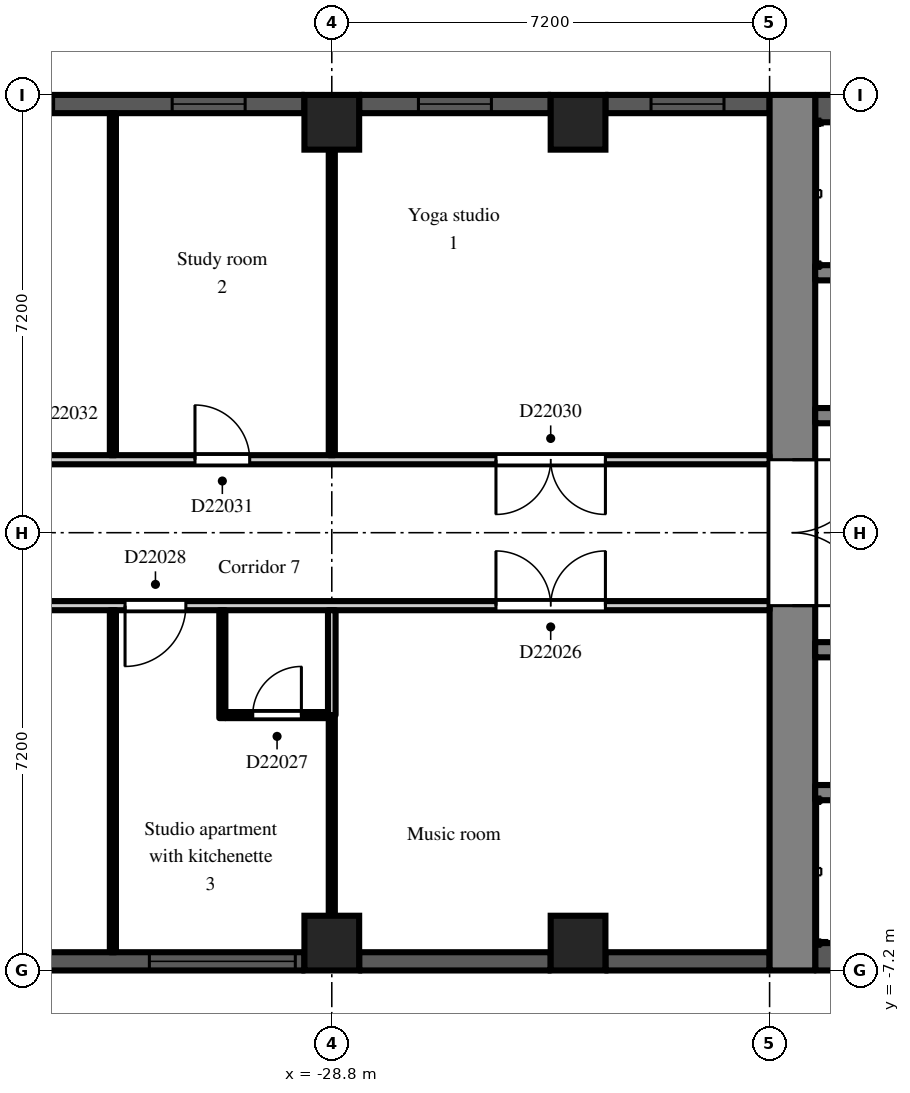
"""IFC4 building model, lengths in metres.
Left out: names, types, materials, properties, quantities, classifications, styles, units other than length and angle.
Written with IfcOpenShell. Run it as: python <this file> out.ifc"""

import sys

from ifc_helpers import new_model, si_unit, direction, frame, frame_2d, origin, origin_2d, place, context, subcontext, project, spatial, rectangle, extrude, element, fill, save


model = new_model("IFC4")
c1 = context("Model", 3, precision=1e-05, world=origin(), true_north=direction((0.0, 1.0)))
c2 = subcontext(c1, "Body", "Model", "MODEL_VIEW")
j1 = project(units=[si_unit("LENGTHUNIT", "METRE"), si_unit("PLANEANGLEUNIT", "RADIAN")], contexts=[c1])
p1 = place(None, origin())
s1 = spatial("IfcSite", under=j1, at=p1, CompositionType="ELEMENT")
p2 = place(p1, origin())
s2 = spatial("IfcBuilding", under=s1, at=p2, CompositionType="ELEMENT")
p3 = place(p2, frame((0.0, 0.0, 159.3)))
s3 = spatial("IfcBuildingStorey", under=s2, at=p3, CompositionType="ELEMENT", Elevation=159.3)
for number, where, z_axis, x_axis in (
    (1, (-28.8, -6.75, 0.0), (0.0, 0.0, 1.0), (1.0, 0.0, 0.0)),
    (2, (-28.8, 6.75, 0.0), (0.0, 0.0, 1.0), (1.0, 0.0, 0.0)),
    (3, (-24.75, -6.75, 0.0), (0.0, 0.0, 1.0), (1.0, 0.0, 0.0)),
    (4, (-24.75, 6.75, 0.0), (0.0, 0.0, 1.0), (1.0, 0.0, 0.0)),
):
    element("IfcColumn", number, at=place(p3, frame(where, z_axis=z_axis, x_axis=x_axis)), inside=s3, PredefinedType="COLUMN", context=c2, shape_type="SweptSolid", body=[
        extrude(rectangle(XDim=0.9, YDim=0.9, at=origin_2d()), origin(), (0.0, 0.0, 1.0), 3.0),
    ])
p4 = place(p3, frame((-21.6, 7.05, 0.0), z_axis=(0.0, 0.0, 1.0), x_axis=(-1.0, 0.0, 0.0)))
e5 = element("IfcWall", 5, at=p4, inside=s3, PredefinedType="SOLIDWALL", context=c2, shape_type="SweptSolid", body=[
    extrude(rectangle(XDim=2.7, YDim=0.3, at=frame_2d((1.35, 0.0))), origin(), (0.0, 0.0, 1.0), 2.2),
])
p5 = place(p4, frame((0.75, 0.0, 0.2)))
e6 = element("IfcOpeningElement", 6, at=p5, cuts=e5, PredefinedType="OPENING", context=c2, shape_type="SweptSolid", body=[
    extrude(rectangle(XDim=1.2, YDim=1.85, at=frame_2d((0.6, 0.925))), frame((0.0, 0.16, 0.0), z_axis=(0.0, -1.0, 0.0), x_axis=(1.0, 0.0, 0.0)), (0.0, 0.0, 1.0), 0.32),
])
p6 = place(p3, frame((-25.2, 7.05, 0.0), z_axis=(0.0, 0.0, 1.0), x_axis=(-1.0, 0.0, 0.0)))
e7 = element("IfcWall", 7, at=p6, inside=s3, PredefinedType="SOLIDWALL", context=c2, shape_type="SweptSolid", body=[
    extrude(rectangle(XDim=3.15, YDim=0.3, at=frame_2d((1.575, 0.0))), origin(), (0.0, 0.0, 1.0), 2.2),
])
p7 = place(p6, frame((0.975, 0.0, 0.2)))
e8 = element("IfcOpeningElement", 8, at=p7, cuts=e7, PredefinedType="OPENING", context=c2, shape_type="SweptSolid", body=[
    extrude(rectangle(XDim=1.2, YDim=1.85, at=frame_2d((0.6, 0.925))), frame((0.0, 0.16, 0.0), z_axis=(0.0, -1.0, 0.0), x_axis=(1.0, 0.0, 0.0)), (0.0, 0.0, 1.0), 0.32),
])
p8 = place(p3, frame((-29.25, 7.05, 0.0), z_axis=(0.0, 0.0, 1.0), x_axis=(-1.0, 0.0, 0.0)))
e9 = element("IfcWall", 9, at=p8, inside=s3, PredefinedType="SOLIDWALL", context=c2, shape_type="SweptSolid", body=[
    extrude(rectangle(XDim=6.3, YDim=0.3, at=frame_2d((3.15, 0.0))), origin(), (0.0, 0.0, 1.0), 2.2),
])
p9 = place(p8, frame((0.975, 0.0, 0.2)))
e10 = element("IfcOpeningElement", 10, at=p9, cuts=e9, PredefinedType="OPENING", context=c2, shape_type="SweptSolid", body=[
    extrude(rectangle(XDim=1.2, YDim=1.85, at=frame_2d((0.6, 0.925))), frame((0.0, 0.16, 0.0), z_axis=(0.0, -1.0, 0.0), x_axis=(1.0, 0.0, 0.0)), (0.0, 0.0, 1.0), 0.32),
])
p10 = place(p8, frame((4.125, 0.0, 0.2)))
e11 = element("IfcOpeningElement", 11, at=p10, cuts=e9, PredefinedType="OPENING", context=c2, shape_type="SweptSolid", body=[
    extrude(rectangle(XDim=1.2, YDim=1.85, at=frame_2d((0.6, 0.925))), frame((0.0, 0.16, 0.0), z_axis=(0.0, -1.0, 0.0), x_axis=(1.0, 0.0, 0.0)), (0.0, 0.0, 1.0), 0.32),
])
p11 = place(p3, frame((-35.55, -7.05, 0.0), z_axis=(0.0, 0.0, 1.0), x_axis=(1.0, 0.0, 0.0)))
e12 = element("IfcWall", 12, at=p11, inside=s3, PredefinedType="SOLIDWALL", context=c2, shape_type="SweptSolid", body=[
    extrude(rectangle(XDim=6.3, YDim=0.3, at=frame_2d((3.15, 0.0))), origin(), (0.0, 0.0, 1.0), 2.2),
])
p12 = place(p11, frame((3.75, 0.0, 0.2)))
e13 = element("IfcOpeningElement", 13, at=p12, cuts=e12, PredefinedType="OPENING", context=c2, shape_type="SweptSolid", body=[
    extrude(rectangle(XDim=2.4, YDim=1.85, at=frame_2d((1.2, 0.925))), frame((0.0, 0.16, 0.0), z_axis=(0.0, -1.0, 0.0), x_axis=(1.0, 0.0, 0.0)), (0.0, 0.0, 1.0), 0.32),
])
p13 = place(p3, frame((-28.35, -7.05, 0.0), z_axis=(0.0, 0.0, 1.0), x_axis=(1.0, 0.0, 0.0)))
e14 = element("IfcWall", 14, at=p13, inside=s3, PredefinedType="SOLIDWALL", context=c2, shape_type="SweptSolid", body=[
    extrude(rectangle(XDim=3.15, YDim=0.3, at=frame_2d((1.575, 0.0))), origin(), (0.0, 0.0, 1.0), 2.2),
])
p14 = place(p3, frame((-24.3, -7.05, 0.0), z_axis=(0.0, 0.0, 1.0), x_axis=(1.0, 0.0, 0.0)))
e15 = element("IfcWall", 15, at=p14, inside=s3, PredefinedType="SOLIDWALL", context=c2, shape_type="SweptSolid", body=[
    extrude(rectangle(XDim=2.7, YDim=0.3, at=frame_2d((1.35, 0.0))), origin(), (0.0, 0.0, 1.0), 2.2),
])
p15 = place(p3, frame((-21.225, -7.2, 0.0), z_axis=(0.0, 0.0, 1.0), x_axis=(0.0, 1.0, 0.0)))
e16 = element("IfcWall", 16, at=p15, inside=s3, PredefinedType="SHEAR", context=c2, shape_type="SweptSolid", body=[
    extrude(rectangle(XDim=14.4, YDim=0.75, at=frame_2d((7.2, 0.0))), origin(), (0.0, 0.0, 1.0), 2.55),
])
p16 = place(p15, frame((6.0, 0.0, 0.0)))
e17 = element("IfcOpeningElement", 17, at=p16, cuts=e16, PredefinedType="OPENING", context=c2, shape_type="SweptSolid", body=[
    extrude(rectangle(XDim=2.4, YDim=2.2, at=frame_2d((1.2, 1.1))), frame((0.0, 0.385, 0.0), z_axis=(0.0, -1.0, 0.0), x_axis=(1.0, 0.0, 0.0)), (0.0, 0.0, 1.0), 0.77),
])
p17 = place(p3, frame((-7.9, 6.975, 0.0), z_axis=(0.0, 0.0, 1.0), x_axis=(-1.0, 0.0, 0.0)))
e18 = element("IfcWall", 18, at=p17, inside=s3, PredefinedType="SHEAR", context=c2, shape_type="SweptSolid", body=[
    extrude(rectangle(XDim=12.95, YDim=0.45, at=frame_2d((6.475, 0.0))), origin(), (0.0, 0.0, 1.0), 2.55),
])
p18 = place(p3, frame((-7.9, 1.925, 0.0), z_axis=(0.0, 0.0, 1.0), x_axis=(-1.0, 0.0, 0.0)))
e19 = element("IfcWall", 19, at=p18, inside=s3, PredefinedType="SHEAR", context=c2, shape_type="SweptSolid", body=[
    extrude(rectangle(XDim=12.95, YDim=0.25, at=frame_2d((6.475, 0.0))), origin(), (0.0, 0.0, 1.0), 2.55),
])
p19 = place(p18, frame((4.825, 0.0, 0.0)))
e20 = element("IfcOpeningElement", 20, at=p19, cuts=e19, PredefinedType="OPENING", context=c2, shape_type="SweptSolid", body=[
    extrude(rectangle(XDim=1.1, YDim=2.1, at=frame_2d((0.55, 1.05))), frame((0.0, 0.135, 0.0), z_axis=(0.0, -1.0, 0.0), x_axis=(1.0, 0.0, 0.0)), (0.0, 0.0, 1.0), 0.27),
])
p20 = place(p18, frame((7.025, 0.0, 0.0)))
e21 = element("IfcOpeningElement", 21, at=p20, cuts=e19, PredefinedType="OPENING", context=c2, shape_type="SweptSolid", body=[
    extrude(rectangle(XDim=1.1, YDim=2.1, at=frame_2d((0.55, 1.05))), frame((0.0, 0.135, 0.0), z_axis=(0.0, -1.0, 0.0), x_axis=(1.0, 0.0, 0.0)), (0.0, 0.0, 1.0), 0.27),
])
p21 = place(p18, frame((9.225, 0.0, 0.0)))
e22 = element("IfcOpeningElement", 22, at=p21, cuts=e19, PredefinedType="OPENING", context=c2, shape_type="SweptSolid", body=[
    extrude(rectangle(XDim=1.1, YDim=2.1, at=frame_2d((0.55, 1.05))), frame((0.0, 0.135, 0.0), z_axis=(0.0, -1.0, 0.0), x_axis=(1.0, 0.0, 0.0)), (0.0, 0.0, 1.0), 0.27),
])
p22 = place(p18, frame((0.525, 0.0, 0.0)))
e23 = element("IfcOpeningElement", 23, at=p22, cuts=e19, PredefinedType="OPENING", context=c2, shape_type="SweptSolid", body=[
    extrude(rectangle(XDim=0.9, YDim=2.1, at=frame_2d((0.45, 1.05))), frame((0.0, 0.135, 0.0), z_axis=(0.0, -1.0, 0.0), x_axis=(1.0, 0.0, 0.0)), (0.0, 0.0, 1.0), 0.27),
])
p23 = place(p18, frame((2.625, 0.0, 0.0)))
e24 = element("IfcOpeningElement", 24, at=p23, cuts=e19, PredefinedType="OPENING", context=c2, shape_type="SweptSolid", body=[
    extrude(rectangle(XDim=1.1, YDim=2.1, at=frame_2d((0.55, 1.05))), frame((0.0, 0.135, 0.0), z_axis=(0.0, -1.0, 0.0), x_axis=(1.0, 0.0, 0.0)), (0.0, 0.0, 1.0), 0.27),
])
p24 = place(p18, frame((11.525, 0.0, 0.0)))
e25 = element("IfcOpeningElement", 25, at=p24, cuts=e19, PredefinedType="OPENING", context=c2, shape_type="SweptSolid", body=[
    extrude(rectangle(XDim=0.9, YDim=2.1, at=frame_2d((0.45, 1.05))), frame((0.0, 0.135, 0.0), z_axis=(0.0, -1.0, 0.0), x_axis=(1.0, 0.0, 0.0)), (0.0, 0.0, 1.0), 0.27),
])
p25 = place(p3, frame((-12.3, 4.275, 0.0), z_axis=(0.0, 0.0, 1.0), x_axis=(-1.0, 0.0, 0.0)))
e26 = element("IfcWall", 26, at=p25, inside=s3, PredefinedType="SHEAR", context=c2, shape_type="SweptSolid", body=[
    extrude(rectangle(XDim=8.55, YDim=0.25, at=frame_2d((4.275, 0.0))), origin(), (0.0, 0.0, 1.0), 2.55),
])
p26 = place(p3, frame((-7.9, -6.975, 0.0), z_axis=(0.0, 0.0, 1.0), x_axis=(-1.0, 0.0, 0.0)))
e27 = element("IfcWall", 27, at=p26, inside=s3, PredefinedType="SHEAR", context=c2, shape_type="SweptSolid", body=[
    extrude(rectangle(XDim=12.95, YDim=0.45, at=frame_2d((6.475, 0.0))), origin(), (0.0, 0.0, 1.0), 2.55),
])
p27 = place(p3, frame((-7.9, -1.925, 0.0), z_axis=(0.0, 0.0, 1.0), x_axis=(-1.0, 0.0, 0.0)))
e28 = element("IfcWall", 28, at=p27, inside=s3, PredefinedType="SHEAR", context=c2, shape_type="SweptSolid", body=[
    extrude(rectangle(XDim=12.95, YDim=0.25, at=frame_2d((6.475, 0.0))), origin(), (0.0, 0.0, 1.0), 2.55),
])
p28 = place(p27, frame((0.525, 0.0, 0.0)))
e29 = element("IfcOpeningElement", 29, at=p28, cuts=e28, PredefinedType="OPENING", context=c2, shape_type="SweptSolid", body=[
    extrude(rectangle(XDim=0.9, YDim=2.1, at=frame_2d((0.45, 1.05))), frame((0.0, 0.135, 0.0), z_axis=(0.0, -1.0, 0.0), x_axis=(1.0, 0.0, 0.0)), (0.0, 0.0, 1.0), 0.27),
])
p29 = place(p27, frame((2.625, 0.0, 0.0)))
e30 = element("IfcOpeningElement", 30, at=p29, cuts=e28, PredefinedType="OPENING", context=c2, shape_type="SweptSolid", body=[
    extrude(rectangle(XDim=1.1, YDim=2.1, at=frame_2d((0.55, 1.05))), frame((0.0, 0.135, 0.0), z_axis=(0.0, -1.0, 0.0), x_axis=(1.0, 0.0, 0.0)), (0.0, 0.0, 1.0), 0.27),
])
p30 = place(p27, frame((8.225, 0.0, 0.0)))
e31 = element("IfcOpeningElement", 31, at=p30, cuts=e28, PredefinedType="OPENING", context=c2, shape_type="SweptSolid", body=[
    extrude(rectangle(XDim=0.9, YDim=2.1, at=frame_2d((0.45, 1.05))), frame((0.0, 0.135, 0.0), z_axis=(0.0, -1.0, 0.0), x_axis=(1.0, 0.0, 0.0)), (0.0, 0.0, 1.0), 0.27),
])
p31 = place(p3, frame((-12.3, -4.275, 0.0), z_axis=(0.0, 0.0, 1.0), x_axis=(-1.0, 0.0, 0.0)))
e32 = element("IfcWall", 32, at=p31, inside=s3, PredefinedType="SHEAR", context=c2, shape_type="SweptSolid", body=[
    extrude(rectangle(XDim=8.55, YDim=0.25, at=frame_2d((4.275, 0.0))), origin(), (0.0, 0.0, 1.0), 2.55),
])
p32 = place(p3, frame((-36.5, -1.2, 0.0), z_axis=(0.0, 0.0, 1.0), x_axis=(1.0, 0.0, 0.0)))
e33 = element("IfcWall", 33, at=p32, inside=s3, PredefinedType="PARTITIONING", context=c2, shape_type="SweptSolid", body=[
    extrude(rectangle(XDim=14.9, YDim=0.15, at=frame_2d((7.45, 0.0))), origin(), (0.0, 0.0, 1.0), 2.55),
])
p33 = place(p32, frame((10.4, 0.0, 0.0)))
e34 = element("IfcOpeningElement", 34, at=p33, cuts=e33, PredefinedType="OPENING", context=c2, shape_type="SweptSolid", body=[
    extrude(rectangle(XDim=1.8, YDim=2.1, at=frame_2d((0.9, 1.05))), frame((0.0, 0.085, 0.0), z_axis=(0.0, -1.0, 0.0), x_axis=(1.0, 0.0, 0.0)), (0.0, 0.0, 1.0), 0.17),
])
p34 = place(p32, frame((4.3, 0.0, 0.0)))
e35 = element("IfcOpeningElement", 35, at=p34, cuts=e33, PredefinedType="OPENING", context=c2, shape_type="SweptSolid", body=[
    extrude(rectangle(XDim=1.0, YDim=2.1, at=frame_2d((0.5, 1.05))), frame((0.0, 0.085, 0.0), z_axis=(0.0, -1.0, 0.0), x_axis=(1.0, 0.0, 0.0)), (0.0, 0.0, 1.0), 0.17),
])
p35 = place(p32, frame((1.15, 0.0, 0.0)))
e36 = element("IfcOpeningElement", 36, at=p35, cuts=e33, PredefinedType="OPENING", context=c2, shape_type="SweptSolid", body=[
    extrude(rectangle(XDim=1.8, YDim=2.1, at=frame_2d((0.9, 1.05))), frame((0.0, 0.085, 0.0), z_axis=(0.0, -1.0, 0.0), x_axis=(1.0, 0.0, 0.0)), (0.0, 0.0, 1.0), 0.17),
])
p36 = place(p3, frame((-36.5, 1.2, 0.0), z_axis=(0.0, 0.0, 1.0), x_axis=(1.0, 0.0, 0.0)))
e37 = element("IfcWall", 37, at=p36, inside=s3, PredefinedType="PARTITIONING", context=c2, shape_type="SweptSolid", body=[
    extrude(rectangle(XDim=14.9, YDim=0.15, at=frame_2d((7.45, 0.0))), origin(), (0.0, 0.0, 1.0), 2.55),
])
p37 = place(p36, frame((10.4, 0.0, 0.0)))
e38 = element("IfcOpeningElement", 38, at=p37, cuts=e37, PredefinedType="OPENING", context=c2, shape_type="SweptSolid", body=[
    extrude(rectangle(XDim=1.8, YDim=2.1, at=frame_2d((0.9, 1.05))), frame((0.0, 0.085, 0.0), z_axis=(0.0, -1.0, 0.0), x_axis=(1.0, 0.0, 0.0)), (0.0, 0.0, 1.0), 0.17),
])
p38 = place(p36, frame((5.45, 0.0, 0.0)))
e39 = element("IfcOpeningElement", 39, at=p38, cuts=e37, PredefinedType="OPENING", context=c2, shape_type="SweptSolid", body=[
    extrude(rectangle(XDim=0.9, YDim=2.1, at=frame_2d((0.45, 1.05))), frame((0.0, 0.085, 0.0), z_axis=(0.0, -1.0, 0.0), x_axis=(1.0, 0.0, 0.0)), (0.0, 0.0, 1.0), 0.17),
])
p39 = place(p36, frame((1.15, 0.0, 0.0)))
e40 = element("IfcOpeningElement", 40, at=p39, cuts=e37, PredefinedType="OPENING", context=c2, shape_type="SweptSolid", body=[
    extrude(rectangle(XDim=1.8, YDim=2.1, at=frame_2d((0.9, 1.05))), frame((0.0, 0.085, 0.0), z_axis=(0.0, -1.0, 0.0), x_axis=(1.0, 0.0, 0.0)), (0.0, 0.0, 1.0), 0.17),
])
for number, where, z_axis, x_axis in (
    (41, (-32.4, -6.9, 0.0), (0.0, 0.0, 1.0), (0.0, 1.0, 0.0)),
    (42, (-32.4, 1.275, 0.0), (0.0, 0.0, 1.0), (0.0, 1.0, 0.0)),
):
    element("IfcWall", number, at=place(p3, frame(where, z_axis=z_axis, x_axis=x_axis)), inside=s3, PredefinedType="PARTITIONING", context=c2, shape_type="SweptSolid", body=[
        extrude(rectangle(XDim=5.625, YDim=0.1, at=frame_2d((2.812, 0.0))), origin(), (0.0, 0.0, 1.0), 2.55),
    ])
p40 = place(p3, frame((-30.6, -3.05, 0.0), z_axis=(0.0, 0.0, 1.0), x_axis=(0.0, 1.0, 0.0)))
e43 = element("IfcWall", 43, at=p40, inside=s3, PredefinedType="PARTITIONING", context=c2, shape_type="SweptSolid", body=[
    extrude(rectangle(XDim=1.775, YDim=0.1, at=frame_2d((0.888, 0.0))), origin(), (0.0, 0.0, 1.0), 2.55),
])
p41 = place(p3, frame((-30.55, -3.0, 0.0), z_axis=(0.0, 0.0, 1.0), x_axis=(1.0, 0.0, 0.0)))
e44 = element("IfcWall", 44, at=p41, inside=s3, PredefinedType="PARTITIONING", context=c2, shape_type="SweptSolid", body=[
    extrude(rectangle(XDim=1.688, YDim=0.1, at=frame_2d((0.844, 0.0))), origin(), (0.0, 0.0, 1.0), 2.55),
])
p42 = place(p41, frame((0.45, 0.0, 0.0)))
e45 = element("IfcOpeningElement", 45, at=p42, cuts=e44, PredefinedType="OPENING", context=c2, shape_type="SweptSolid", body=[
    extrude(rectangle(XDim=0.8, YDim=2.1, at=frame_2d((0.4, 1.05))), frame((0.0, 0.06, 0.0), z_axis=(0.0, -1.0, 0.0), x_axis=(1.0, 0.0, 0.0)), (0.0, 0.0, 1.0), 0.12),
])
p43 = place(p3, frame((-28.8, -6.9, 0.0), z_axis=(0.0, 0.0, 1.0), x_axis=(0.0, 1.0, 0.0)))
e46 = element("IfcWall", 46, at=p43, inside=s3, PredefinedType="PARTITIONING", context=c2, shape_type="SweptSolid", body=[
    extrude(rectangle(XDim=3.9, YDim=0.1, at=frame_2d((1.95, 0.0))), origin(), (0.0, 0.0, 1.0), 2.55),
])
p44 = place(p3, frame((-28.8, -3.0, 0.0), z_axis=(0.0, 0.0, 1.0), x_axis=(0.0, 1.0, 0.0)))
e47 = element("IfcWall", 47, at=p44, inside=s3, PredefinedType="PARTITIONING", context=c2, shape_type="SweptSolid", body=[
    extrude(rectangle(XDim=1.725, YDim=0.125, at=frame_2d((0.863, 0.0))), origin(), (0.0, 0.0, 1.0), 2.55),
])
p45 = place(p3, frame((-28.8, 1.275, 0.0), z_axis=(0.0, 0.0, 1.0), x_axis=(0.0, 1.0, 0.0)))
e48 = element("IfcWall", 48, at=p45, inside=s3, PredefinedType="PARTITIONING", context=c2, shape_type="SweptSolid", body=[
    extrude(rectangle(XDim=5.625, YDim=0.1, at=frame_2d((2.812, 0.0))), origin(), (0.0, 0.0, 1.0), 2.55),
])
p46 = place(p5, origin())
e49 = element("IfcWindow", 49, at=p46, inside=s3, PartitioningType="SINGLE_PANEL", PredefinedType="WINDOW", context=c2, shape_type="SweptSolid", body=[
    extrude(rectangle(XDim=1.2, YDim=1.85, at=frame_2d((0.6, 0.925))), frame((0.0, 0.03, 0.0), z_axis=(0.0, -1.0, 0.0), x_axis=(1.0, 0.0, 0.0)), (0.0, 0.0, 1.0), 0.06),
])
fill(e6, e49)
p47 = place(p7, origin())
e50 = element("IfcWindow", 50, at=p47, inside=s3, PartitioningType="SINGLE_PANEL", PredefinedType="WINDOW", context=c2, shape_type="SweptSolid", body=[
    extrude(rectangle(XDim=1.2, YDim=1.85, at=frame_2d((0.6, 0.925))), frame((0.0, 0.03, 0.0), z_axis=(0.0, -1.0, 0.0), x_axis=(1.0, 0.0, 0.0)), (0.0, 0.0, 1.0), 0.06),
])
fill(e8, e50)
p48 = place(p9, origin())
e51 = element("IfcWindow", 51, at=p48, inside=s3, PartitioningType="SINGLE_PANEL", PredefinedType="WINDOW", context=c2, shape_type="SweptSolid", body=[
    extrude(rectangle(XDim=1.2, YDim=1.85, at=frame_2d((0.6, 0.925))), frame((0.0, 0.03, 0.0), z_axis=(0.0, -1.0, 0.0), x_axis=(1.0, 0.0, 0.0)), (0.0, 0.0, 1.0), 0.06),
])
fill(e10, e51)
p49 = place(p10, origin())
e52 = element("IfcWindow", 52, at=p49, inside=s3, PartitioningType="SINGLE_PANEL", PredefinedType="WINDOW", context=c2, shape_type="SweptSolid", body=[
    extrude(rectangle(XDim=1.2, YDim=1.85, at=frame_2d((0.6, 0.925))), frame((0.0, 0.03, 0.0), z_axis=(0.0, -1.0, 0.0), x_axis=(1.0, 0.0, 0.0)), (0.0, 0.0, 1.0), 0.06),
])
fill(e11, e52)
p50 = place(p12, origin())
e53 = element("IfcWindow", 53, at=p50, inside=s3, PartitioningType="SINGLE_PANEL", PredefinedType="WINDOW", context=c2, shape_type="SweptSolid", body=[
    extrude(rectangle(XDim=2.4, YDim=1.85, at=frame_2d((1.2, 0.925))), frame((0.0, 0.03, 0.0), z_axis=(0.0, -1.0, 0.0), x_axis=(1.0, 0.0, 0.0)), (0.0, 0.0, 1.0), 0.06),
])
fill(e13, e53)
p51 = place(p16, frame((2.4, 0.0, 0.0), z_axis=(0.0, 0.0, 1.0), x_axis=(-1.0, 0.0, 0.0)))
e54 = element("IfcDoor", 54, at=p51, inside=s3, OperationType="DOUBLE_DOOR_DOUBLE_SWING", PredefinedType="DOOR", context=c2, shape_type="SweptSolid", body=[
    extrude(rectangle(XDim=2.4, YDim=2.2, at=frame_2d((1.2, 1.1))), frame((0.0, 0.025, 0.0), z_axis=(0.0, -1.0, 0.0), x_axis=(1.0, 0.0, 0.0)), (0.0, 0.0, 1.0), 0.05),
])
fill(e17, e54)
p52 = place(p33, origin())
e55 = element("IfcDoor", 55, at=p52, inside=s3, OperationType="DOUBLE_DOOR_DOUBLE_SWING", PredefinedType="DOOR", context=c2, shape_type="SweptSolid", body=[
    extrude(rectangle(XDim=1.8, YDim=2.1, at=frame_2d((0.9, 1.05))), frame((0.0, 0.025, 0.0), z_axis=(0.0, -1.0, 0.0), x_axis=(1.0, 0.0, 0.0)), (0.0, 0.0, 1.0), 0.05),
])
fill(e34, e55)
p53 = place(p42, origin())
e56 = element("IfcDoor", 56, at=p53, inside=s3, OperationType="SINGLE_SWING_RIGHT", PredefinedType="DOOR", context=c2, shape_type="SweptSolid", body=[
    extrude(rectangle(XDim=0.8, YDim=2.1, at=frame_2d((0.4, 1.05))), frame((0.0, 0.025, 0.0), z_axis=(0.0, -1.0, 0.0), x_axis=(1.0, 0.0, 0.0)), (0.0, 0.0, 1.0), 0.05),
])
fill(e45, e56)
p54 = place(p34, frame((1.0, 0.0, 0.0), z_axis=(0.0, 0.0, 1.0), x_axis=(-1.0, 0.0, 0.0)))
e57 = element("IfcDoor", 57, at=p54, inside=s3, OperationType="SINGLE_SWING_RIGHT", PredefinedType="DOOR", context=c2, shape_type="SweptSolid", body=[
    extrude(rectangle(XDim=1.0, YDim=2.1, at=frame_2d((0.5, 1.05))), frame((0.0, 0.025, 0.0), z_axis=(0.0, -1.0, 0.0), x_axis=(1.0, 0.0, 0.0)), (0.0, 0.0, 1.0), 0.05),
])
fill(e35, e57)
p55 = place(p37, frame((1.8, 0.0, 0.0), z_axis=(0.0, 0.0, 1.0), x_axis=(-1.0, 0.0, 0.0)))
e58 = element("IfcDoor", 58, at=p55, inside=s3, OperationType="DOUBLE_DOOR_DOUBLE_SWING", PredefinedType="DOOR", context=c2, shape_type="SweptSolid", body=[
    extrude(rectangle(XDim=1.8, YDim=2.1, at=frame_2d((0.9, 1.05))), frame((0.0, 0.025, 0.0), z_axis=(0.0, -1.0, 0.0), x_axis=(1.0, 0.0, 0.0)), (0.0, 0.0, 1.0), 0.05),
])
fill(e38, e58)
p56 = place(p38, origin())
e59 = element("IfcDoor", 59, at=p56, inside=s3, OperationType="SINGLE_SWING_LEFT", PredefinedType="DOOR", context=c2, shape_type="SweptSolid", body=[
    extrude(rectangle(XDim=0.9, YDim=2.1, at=frame_2d((0.45, 1.05))), frame((0.0, 0.025, 0.0), z_axis=(0.0, -1.0, 0.0), x_axis=(1.0, 0.0, 0.0)), (0.0, 0.0, 1.0), 0.05),
])
fill(e39, e59)
save(model, sys.argv[1])
